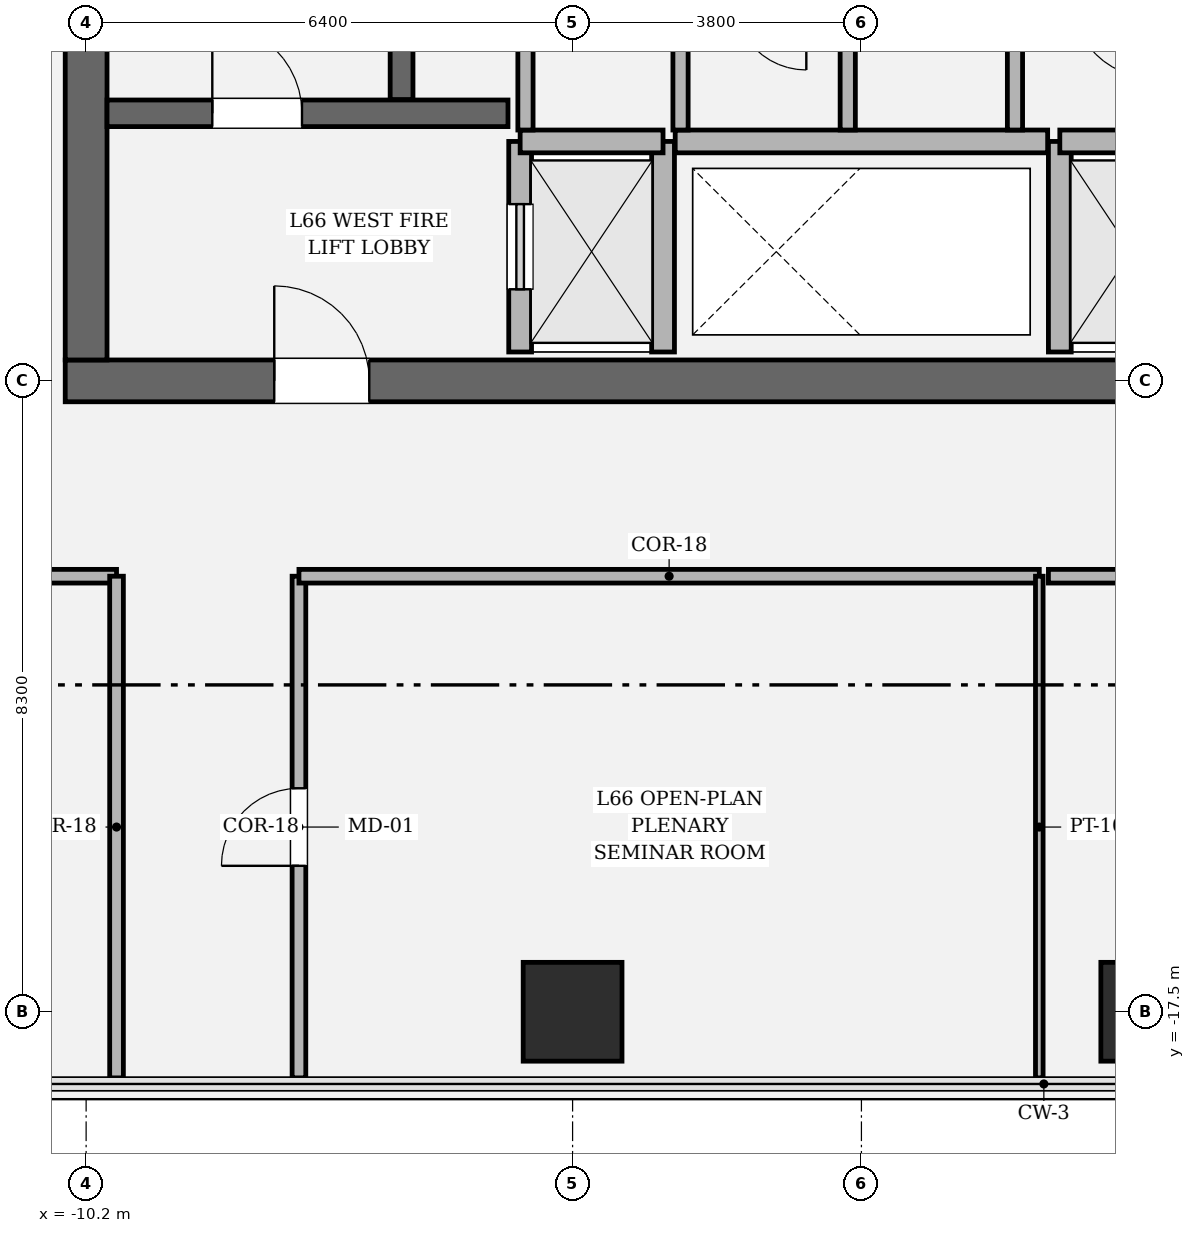
"""IFC4 building model, lengths in metres.
Left out: names, types, materials, properties, quantities, classifications, styles, units other than length and angle.
Written with IfcOpenShell. Run it as: python <this file> out.ifc"""

import sys

from ifc_helpers import new_model, si_unit, direction, frame, frame_2d, origin, origin_2d, place, context, subcontext, project, spatial, rectangle, hollow_rectangle, extrude, element, fill, save


model = new_model("IFC4")
c1 = context("Model", 3, precision=1e-05, world=origin(), true_north=direction((0.0, 1.0)))
c2 = subcontext(c1, "Body", "Model", "MODEL_VIEW")
j1 = project(units=[si_unit("LENGTHUNIT", "METRE"), si_unit("PLANEANGLEUNIT", "RADIAN")], contexts=[c1])
p1 = place(None, origin())
s1 = spatial("IfcSite", under=j1, at=p1, CompositionType="ELEMENT")
p2 = place(p1, origin())
s2 = spatial("IfcBuilding", under=s1, at=p2, CompositionType="ELEMENT")
p3 = place(p2, frame((0.0, 0.0, 279.75)))
s3 = spatial("IfcBuildingStorey", under=s2, at=p3, CompositionType="ELEMENT", Elevation=279.75)
p4 = place(p3, frame((10.475, -9.2, 0.0), z_axis=(0.0, 0.0, 1.0), x_axis=(-1.0, 0.0, 0.0)))
e1 = element("IfcWall", 1, at=p4, inside=s3, PredefinedType="SHEAR", context=c2, shape_type="SweptSolid", body=[
    extrude(rectangle(XDim=20.95, YDim=0.55, at=frame_2d((10.475, 0.0))), origin(), (0.0, 0.0, 1.0), 4.05),
])
p5 = place(p4, frame((2.75, 0.0, 0.0)))
e2 = element("IfcOpeningElement", 2, at=p5, cuts=e1, PredefinedType="OPENING", context=c2, shape_type="SweptSolid", body=[
    extrude(rectangle(XDim=1.25, YDim=2.25, at=frame_2d((0.625, 1.125))), frame((0.0, 0.285, 0.0), z_axis=(0.0, -1.0, 0.0), x_axis=(1.0, 0.0, 0.0)), (0.0, 0.0, 1.0), 0.57),
])
p6 = place(p4, frame((16.95, 0.0, 0.0)))
e3 = element("IfcOpeningElement", 3, at=p6, cuts=e1, PredefinedType="OPENING", context=c2, shape_type="SweptSolid", body=[
    extrude(rectangle(XDim=1.25, YDim=2.25, at=frame_2d((0.625, 1.125))), frame((0.0, 0.285, 0.0), z_axis=(0.0, -1.0, 0.0), x_axis=(1.0, 0.0, 0.0)), (0.0, 0.0, 1.0), 0.57),
])
p7 = place(p3, frame((-10.2, -8.925, 0.0), z_axis=(0.0, 0.0, 1.0), x_axis=(0.0, 1.0, 0.0)))
e4 = element("IfcWall", 4, at=p7, inside=s3, PredefinedType="SHEAR", context=c2, shape_type="SweptSolid", body=[
    extrude(rectangle(XDim=17.85, YDim=0.55, at=frame_2d((8.925, 0.0))), origin(), (0.0, 0.0, 1.0), 4.05),
])
p8 = place(p7, frame((12.715, 0.0, 0.0)))
e5 = element("IfcOpeningElement", 5, at=p8, cuts=e4, PredefinedType="OPENING", context=c2, shape_type="SweptSolid", body=[
    extrude(rectangle(XDim=1.18, YDim=2.2, at=frame_2d((0.59, 1.1))), frame((0.0, 0.285, 0.0), z_axis=(0.0, -1.0, 0.0), x_axis=(1.0, 0.0, 0.0)), (0.0, 0.0, 1.0), 0.57),
])
p9 = place(p3, frame((-6.05, -5.5, 0.0), z_axis=(0.0, 0.0, 1.0), x_axis=(0.0, 1.0, 0.0)))
e6 = element("IfcWall", 6, at=p9, inside=s3, PredefinedType="SOLIDWALL", context=c2, shape_type="SweptSolid", body=[
    extrude(rectangle(XDim=8.95, YDim=0.3, at=frame_2d((4.475, 0.0))), origin(), (0.0, 0.0, 1.0), 4.05),
])
p10 = place(p3, frame((-9.925, -5.68, 0.0), z_axis=(0.0, 0.0, 1.0), x_axis=(1.0, 0.0, 0.0)))
e7 = element("IfcWall", 7, at=p10, inside=s3, PredefinedType="SOLIDWALL", context=c2, shape_type="SweptSolid", body=[
    extrude(rectangle(XDim=5.275, YDim=0.35, at=frame_2d((2.638, 0.0))), origin(), (0.0, 0.0, 1.0), 4.05),
])
p11 = place(p10, frame((1.385, 0.0, 0.0)))
e8 = element("IfcOpeningElement", 8, at=p11, cuts=e7, PredefinedType="OPENING", context=c2, shape_type="SweptSolid", body=[
    extrude(rectangle(XDim=1.18, YDim=2.2, at=frame_2d((0.59, 1.1))), frame((0.0, 0.185, 0.0), z_axis=(0.0, -1.0, 0.0), x_axis=(1.0, 0.0, 0.0)), (0.0, 0.0, 1.0), 0.37),
])
for number, where, z_axis, x_axis in (
    (9, (-3.8, -17.5, 0.0), (0.0, 0.0, 1.0), (1.0, 0.0, 0.0)),
    (10, (3.8, -17.5, 0.0), (0.0, 0.0, 1.0), (1.0, 0.0, 0.0)),
):
    element("IfcColumn", number, at=place(p3, frame(where, z_axis=z_axis, x_axis=x_axis)), inside=s3, PredefinedType="COLUMN", context=c2, shape_type="SweptSolid", body=[
        extrude(hollow_rectangle(XDim=1.3, YDim=1.3, WallThickness=0.038, at=origin_2d()), origin(), (0.0, 0.0, 1.0), 4.05),
    ])
p12 = place(p3, frame((-4.49, -8.82, 0.0), z_axis=(0.0, 0.0, 1.0), x_axis=(0.0, 1.0, 0.0)))
e11 = element("IfcWall", 11, at=p12, inside=s3, PredefinedType="SOLIDWALL", context=c2, shape_type="SweptSolid", body=[
    extrude(rectangle(XDim=2.77, YDim=0.3, at=frame_2d((1.385, 0.0))), origin(), (0.0, 0.0, 1.0), 3.77),
])
p13 = place(p12, frame((0.825, 0.0, 0.0)))
e12 = element("IfcOpeningElement", 12, at=p13, cuts=e11, PredefinedType="OPENING", context=c2, shape_type="SweptSolid", body=[
    extrude(rectangle(XDim=1.12, YDim=2.25, at=frame_2d((0.56, 1.125))), frame((0.0, 0.16, 0.0), z_axis=(0.0, -1.0, 0.0), x_axis=(1.0, 0.0, 0.0)), (0.0, 0.0, 1.0), 0.32),
])
p14 = place(p3, frame((-2.61, -8.82, 0.0), z_axis=(0.0, 0.0, 1.0), x_axis=(0.0, 1.0, 0.0)))
e13 = element("IfcWall", 13, at=p14, inside=s3, PredefinedType="SOLIDWALL", context=c2, shape_type="SweptSolid", body=[
    extrude(rectangle(XDim=2.77, YDim=0.3, at=frame_2d((1.385, 0.0))), origin(), (0.0, 0.0, 1.0), 3.77),
])
p15 = place(p3, frame((-4.49, -6.05, 0.0), z_axis=(0.0, 0.0, 1.0), x_axis=(1.0, 0.0, 0.0)))
e14 = element("IfcWall", 14, at=p15, inside=s3, PredefinedType="SOLIDWALL", context=c2, shape_type="SweptSolid", body=[
    extrude(rectangle(XDim=1.88, YDim=0.3, at=frame_2d((0.94, 0.0))), origin(), (0.0, 0.0, 1.0), 3.77),
])
p16 = place(p3, frame((2.61, -8.82, 0.0), z_axis=(0.0, 0.0, 1.0), x_axis=(0.0, 1.0, 0.0)))
e15 = element("IfcWall", 15, at=p16, inside=s3, PredefinedType="SOLIDWALL", context=c2, shape_type="SweptSolid", body=[
    extrude(rectangle(XDim=2.77, YDim=0.3, at=frame_2d((1.385, 0.0))), origin(), (0.0, 0.0, 1.0), 3.77),
])
p17 = place(p3, frame((2.61, -6.05, 0.0), z_axis=(0.0, 0.0, 1.0), x_axis=(1.0, 0.0, 0.0)))
e16 = element("IfcWall", 16, at=p17, inside=s3, PredefinedType="SOLIDWALL", context=c2, shape_type="SweptSolid", body=[
    extrude(rectangle(XDim=1.88, YDim=0.3, at=frame_2d((0.94, 0.0))), origin(), (0.0, 0.0, 1.0), 3.77),
])
p18 = place(p3, frame((-2.45, -6.05, 0.0), z_axis=(0.0, 0.0, 1.0), x_axis=(1.0, 0.0, 0.0)))
e17 = element("IfcWall", 17, at=p18, inside=s3, PredefinedType="SOLIDWALL", context=c2, shape_type="SweptSolid", body=[
    extrude(rectangle(XDim=4.9, YDim=0.3, at=frame_2d((2.45, 0.0))), origin(), (0.0, 0.0, 1.0), 3.77),
])
for number, where, z_axis, x_axis in (
    (18, (-2.38, -5.9, 0.0), (0.0, 0.0, 1.0), (0.0, 1.0, 0.0)),
    (19, (-4.42, -4.16, 0.0), (0.0, 0.0, 1.0), (0.0, -1.0, 0.0)),
    (20, (-0.18, -5.9, 0.0), (0.0, 0.0, 1.0), (0.0, 1.0, 0.0)),
    (21, (2.02, -5.9, 0.0), (0.0, 0.0, 1.0), (0.0, 1.0, 0.0)),
):
    element("IfcWall", number, at=place(p3, frame(where, z_axis=z_axis, x_axis=x_axis)), inside=s3, PredefinedType="SOLIDWALL", context=c2, shape_type="SweptSolid", body=[
        extrude(rectangle(XDim=1.74, YDim=0.2, at=frame_2d((0.87, 0.0))), origin(), (0.0, 0.0, 1.0), 3.77),
    ])
p19 = place(p3, frame((-7.4, -18.37, 0.0), z_axis=(0.0, 0.0, 1.0), x_axis=(0.0, 1.0, 0.0)))
e22 = element("IfcWall", 22, at=p19, inside=s3, PredefinedType="PARTITIONING", context=c2, shape_type="SweptSolid", body=[
    extrude(rectangle(XDim=6.6, YDim=0.18, at=frame_2d((3.3, 0.0))), origin(), (0.0, 0.0, 1.0), 2.444),
])
p20 = place(p19, frame((2.79, 0.0, 0.0)))
e23 = element("IfcOpeningElement", 23, at=p20, cuts=e22, PredefinedType="OPENING", context=c2, shape_type="SweptSolid", body=[
    extrude(rectangle(XDim=1.02, YDim=2.2, at=frame_2d((0.51, 1.1))), frame((0.0, 0.1, 0.0), z_axis=(0.0, -1.0, 0.0), x_axis=(1.0, 0.0, 0.0)), (0.0, 0.0, 1.0), 0.2),
])
p21 = place(p3, frame((-7.4, -11.77, 0.0), z_axis=(0.0, 0.0, 1.0), x_axis=(1.0, 0.0, 0.0)))
e24 = element("IfcWall", 24, at=p21, inside=s3, PredefinedType="PARTITIONING", context=c2, shape_type="SweptSolid", body=[
    extrude(rectangle(XDim=9.74, YDim=0.18, at=frame_2d((4.87, 0.0))), origin(), (0.0, 0.0, 1.0), 2.444),
])
p22 = place(p3, frame((2.34, -11.77, 0.0), z_axis=(0.0, 0.0, 1.0), x_axis=(0.0, -1.0, 0.0)))
e25 = element("IfcWall", 25, at=p22, inside=s3, PredefinedType="PARTITIONING", context=c2, shape_type="SweptSolid", body=[
    extrude(rectangle(XDim=6.6, YDim=0.1, at=frame_2d((3.3, 0.0))), origin(), (0.0, 0.0, 1.0), 2.444),
])
p23 = place(p3, frame((-16.27, -11.77, 0.0), z_axis=(0.0, 0.0, 1.0), x_axis=(1.0, 0.0, 0.0)))
e26 = element("IfcWall", 26, at=p23, inside=s3, PredefinedType="PARTITIONING", context=c2, shape_type="SweptSolid", body=[
    extrude(rectangle(XDim=6.47, YDim=0.18, at=frame_2d((3.235, 0.0))), origin(), (0.0, 0.0, 1.0), 2.444),
])
p24 = place(p23, frame((2.535, 0.0, 0.0)))
e27 = element("IfcOpeningElement", 27, at=p24, cuts=e26, PredefinedType="OPENING", context=c2, shape_type="SweptSolid", body=[
    extrude(rectangle(XDim=1.4, YDim=2.25, at=frame_2d((0.7, 1.125))), frame((0.0, 0.1, 0.0), z_axis=(0.0, -1.0, 0.0), x_axis=(1.0, 0.0, 0.0)), (0.0, 0.0, 1.0), 0.2),
])
p25 = place(p3, frame((-9.8, -11.77, 0.0), z_axis=(0.0, 0.0, 1.0), x_axis=(0.0, -1.0, 0.0)))
e28 = element("IfcWall", 28, at=p25, inside=s3, PredefinedType="PARTITIONING", context=c2, shape_type="SweptSolid", body=[
    extrude(rectangle(XDim=6.6, YDim=0.18, at=frame_2d((3.3, 0.0))), origin(), (0.0, 0.0, 1.0), 2.444),
])
p26 = place(p3, frame((2.46, -11.77, 0.0), z_axis=(0.0, 0.0, 1.0), x_axis=(1.0, 0.0, 0.0)))
e29 = element("IfcWall", 29, at=p26, inside=s3, PredefinedType="PARTITIONING", context=c2, shape_type="SweptSolid", body=[
    extrude(rectangle(XDim=10.31, YDim=0.18, at=frame_2d((5.155, 0.0))), origin(), (0.0, 0.0, 1.0), 2.444),
])
p27 = place(p26, frame((4.455, 0.0, 0.0)))
e30 = element("IfcOpeningElement", 30, at=p27, cuts=e29, PredefinedType="OPENING", context=c2, shape_type="SweptSolid", body=[
    extrude(rectangle(XDim=1.4, YDim=2.25, at=frame_2d((0.7, 1.125))), frame((0.0, 0.1, 0.0), z_axis=(0.0, -1.0, 0.0), x_axis=(1.0, 0.0, 0.0)), (0.0, 0.0, 1.0), 0.2),
])
p28 = place(p11, origin())
e31 = element("IfcDoor", 31, at=p28, inside=s3, OperationType="SINGLE_SWING_LEFT", PredefinedType="DOOR", context=c2, shape_type="SweptSolid", body=[
    extrude(rectangle(XDim=1.18, YDim=2.2, at=frame_2d((0.59, 1.1))), frame((0.0, 0.025, 0.0), z_axis=(0.0, -1.0, 0.0), x_axis=(1.0, 0.0, 0.0)), (0.0, 0.0, 1.0), 0.05),
])
fill(e8, e31)
p29 = place(p6, origin())
e32 = element("IfcDoor", 32, at=p29, inside=s3, OperationType="SINGLE_SWING_RIGHT", PredefinedType="DOOR", context=c2, shape_type="SweptSolid", body=[
    extrude(rectangle(XDim=1.25, YDim=2.25, at=frame_2d((0.625, 1.125))), frame((0.0, 0.025, 0.0), z_axis=(0.0, -1.0, 0.0), x_axis=(1.0, 0.0, 0.0)), (0.0, 0.0, 1.0), 0.05),
])
fill(e3, e32)
p30 = place(p13, origin())
e33 = element("IfcDoor", 33, at=p30, inside=s3, OperationType="SLIDING_TO_LEFT", PredefinedType="DOOR", context=c2, shape_type="SweptSolid", body=[
    extrude(rectangle(XDim=1.12, YDim=2.25, at=frame_2d((0.56, 1.125))), frame((0.0, 0.025, 0.0), z_axis=(0.0, -1.0, 0.0), x_axis=(1.0, 0.0, 0.0)), (0.0, 0.0, 1.0), 0.05),
])
fill(e12, e33)
p31 = place(p20, origin())
e34 = element("IfcDoor", 34, at=p31, inside=s3, OperationType="SINGLE_SWING_LEFT", PredefinedType="DOOR", context=c2, shape_type="SweptSolid", body=[
    extrude(rectangle(XDim=1.02, YDim=2.2, at=frame_2d((0.51, 1.1))), frame((0.0, 0.025, 0.0), z_axis=(0.0, -1.0, 0.0), x_axis=(1.0, 0.0, 0.0)), (0.0, 0.0, 1.0), 0.05),
])
fill(e23, e34)
save(model, sys.argv[1])
